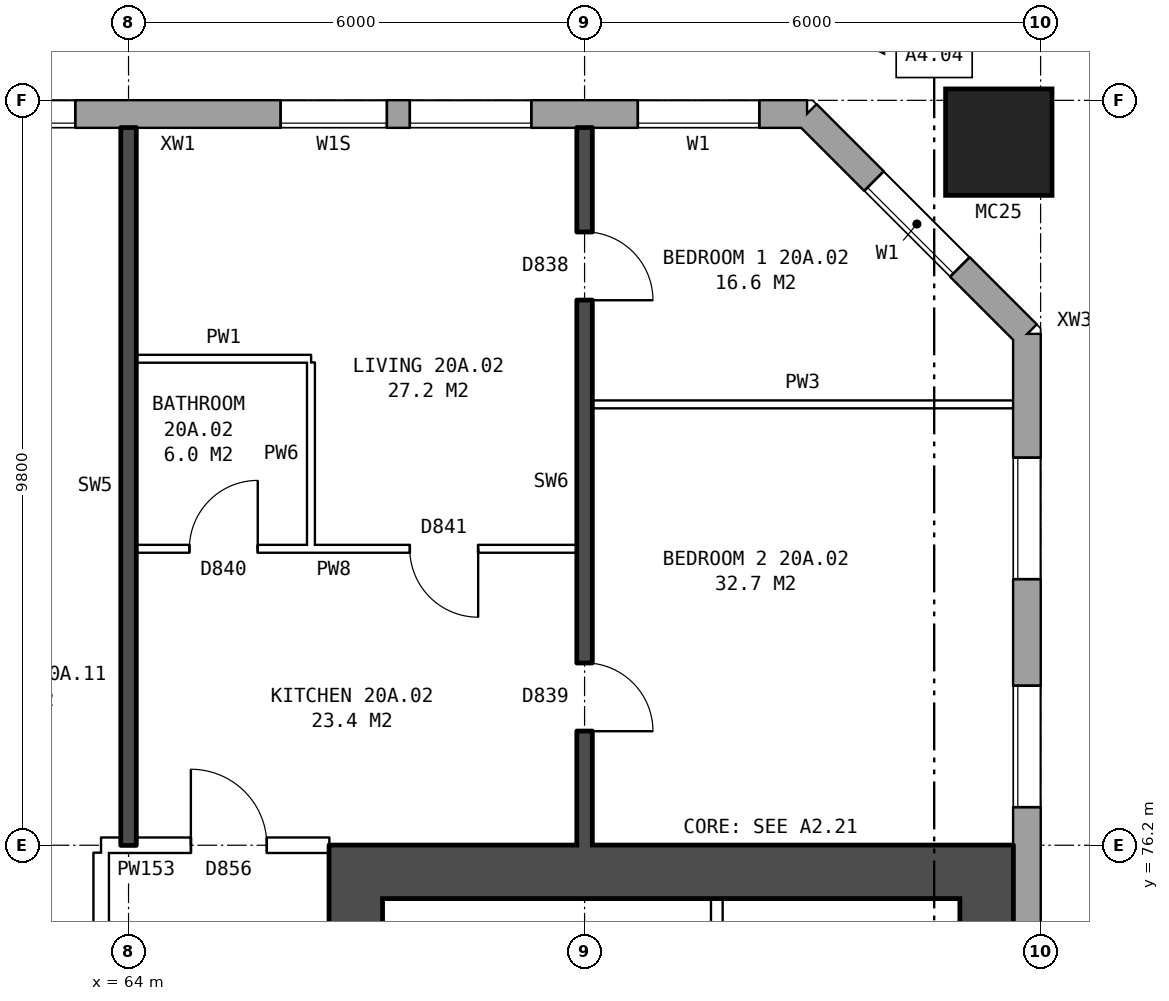
"""IFC4 building model, lengths in metres.
Left out: names, types, materials, properties, quantities, classifications, styles, units other than length and angle.
Written with IfcOpenShell. Run it as: python <this file> out.ifc"""

import sys

from ifc_helpers import new_model, si_unit, direction, frame, frame_2d, origin, origin_2d, place, context, subcontext, project, spatial, rectangle, hollow_rectangle, extrude, element, fill, save


model = new_model("IFC4")
c1 = context("Model", 3, precision=1e-05, world=origin(), true_north=direction((0.0, 1.0)))
c2 = subcontext(c1, "Body", "Model", "MODEL_VIEW")
j1 = project(units=[si_unit("LENGTHUNIT", "METRE"), si_unit("PLANEANGLEUNIT", "RADIAN")], contexts=[c1])
p1 = place(None, origin())
s1 = spatial("IfcSite", under=j1, at=p1, CompositionType="ELEMENT")
p2 = place(p1, origin())
s2 = spatial("IfcBuilding", under=s1, at=p2, CompositionType="ELEMENT")
p3 = place(p2, frame((0.0, 0.0, 74.7)))
s3 = spatial("IfcBuildingStorey", under=s2, at=p3, CompositionType="ELEMENT", Elevation=74.7)
p4 = place(p3, frame((75.45, 85.45, 0.0), z_axis=(0.0, 0.0, 1.0), x_axis=(1.0, 0.0, 0.0)))
e1 = element("IfcColumn", 1, at=p4, inside=s3, PredefinedType="COLUMN", context=c2, shape_type="SweptSolid", body=[
    extrude(hollow_rectangle(XDim=1.4, YDim=1.4, WallThickness=0.075, at=origin_2d()), origin(), (0.0, 0.0, 1.0), 3.1),
])
p5 = place(p3, frame((75.82, 57.075, 0.0), z_axis=(0.0, 0.0, 1.0), x_axis=(0.0, 1.0, 0.0)))
e2 = element("IfcWall", 2, at=p5, inside=s3, PredefinedType="STANDARD", context=c2, shape_type="SweptSolid", body=[
    extrude(rectangle(XDim=25.851, YDim=0.36, at=frame_2d((12.925, 0.0))), origin(), (0.0, 0.0, 1.0), 2.85),
])
p6 = place(p5, frame((1.625, 0.0, 0.8)))
e3 = element("IfcOpeningElement", 3, at=p6, cuts=e2, PredefinedType="OPENING", context=c2, shape_type="SweptSolid", body=[
    extrude(rectangle(XDim=1.6, YDim=1.8, at=frame_2d((0.8, 0.9))), frame((0.0, 0.19, 0.0), z_axis=(0.0, -1.0, 0.0), x_axis=(1.0, 0.0, 0.0)), (0.0, 0.0, 1.0), 0.38),
])
p7 = place(p5, frame((4.625, 0.0, 0.8)))
e4 = element("IfcOpeningElement", 4, at=p7, cuts=e2, PredefinedType="OPENING", context=c2, shape_type="SweptSolid", body=[
    extrude(rectangle(XDim=1.6, YDim=1.8, at=frame_2d((0.8, 0.9))), frame((0.0, 0.19, 0.0), z_axis=(0.0, -1.0, 0.0), x_axis=(1.0, 0.0, 0.0)), (0.0, 0.0, 1.0), 0.38),
])
p8 = place(p5, frame((19.625, 0.0, 0.8)))
e5 = element("IfcOpeningElement", 5, at=p8, cuts=e2, PredefinedType="OPENING", context=c2, shape_type="SweptSolid", body=[
    extrude(rectangle(XDim=1.6, YDim=1.8, at=frame_2d((0.8, 0.9))), frame((0.0, 0.19, 0.0), z_axis=(0.0, -1.0, 0.0), x_axis=(1.0, 0.0, 0.0)), (0.0, 0.0, 1.0), 0.38),
])
p9 = place(p5, frame((22.625, 0.0, 0.8)))
e6 = element("IfcOpeningElement", 6, at=p9, cuts=e2, PredefinedType="OPENING", context=c2, shape_type="SweptSolid", body=[
    extrude(rectangle(XDim=1.6, YDim=1.8, at=frame_2d((0.8, 0.9))), frame((0.0, 0.19, 0.0), z_axis=(0.0, -1.0, 0.0), x_axis=(1.0, 0.0, 0.0)), (0.0, 0.0, 1.0), 0.38),
])
p10 = place(p3, frame((75.82, 82.925, 0.0), z_axis=(0.0, 0.0, 1.0), x_axis=(-0.707106781187, 0.707106781187, 0.0)))
e7 = element("IfcWall", 7, at=p10, inside=s3, PredefinedType="STANDARD", context=c2, shape_type="SweptSolid", body=[
    extrude(rectangle(XDim=4.094, YDim=0.36, at=frame_2d((2.047, 0.0))), origin(), (0.0, 0.0, 1.0), 2.85),
])
p11 = place(p10, frame((1.247, 0.0, 0.8)))
e8 = element("IfcOpeningElement", 8, at=p11, cuts=e7, PredefinedType="OPENING", context=c2, shape_type="SweptSolid", body=[
    extrude(rectangle(XDim=1.6, YDim=1.8, at=frame_2d((0.8, 0.9))), frame((0.0, 0.19, 0.0), z_axis=(0.0, -1.0, 0.0), x_axis=(1.0, 0.0, 0.0)), (0.0, 0.0, 1.0), 0.38),
])
p12 = place(p3, frame((72.925, 85.82, 0.0), z_axis=(0.0, 0.0, 1.0), x_axis=(-1.0, 0.0, 0.0)))
e9 = element("IfcWall", 9, at=p12, inside=s3, PredefinedType="STANDARD", context=c2, shape_type="SweptSolid", body=[
    extrude(rectangle(XDim=46.601, YDim=0.36, at=frame_2d((23.3, 0.0))), origin(), (0.0, 0.0, 1.0), 2.85),
])
p13 = place(p12, frame((0.625, 0.0, 0.8)))
e10 = element("IfcOpeningElement", 10, at=p13, cuts=e9, PredefinedType="OPENING", context=c2, shape_type="SweptSolid", body=[
    extrude(rectangle(XDim=1.6, YDim=1.8, at=frame_2d((0.8, 0.9))), frame((0.0, 0.19, 0.0), z_axis=(0.0, -1.0, 0.0), x_axis=(1.0, 0.0, 0.0)), (0.0, 0.0, 1.0), 0.38),
])
p14 = place(p12, frame((3.625, 0.0, 0.8)))
e11 = element("IfcOpeningElement", 11, at=p14, cuts=e9, PredefinedType="OPENING", context=c2, shape_type="SweptSolid", body=[
    extrude(rectangle(XDim=1.6, YDim=1.8, at=frame_2d((0.8, 0.9))), frame((0.0, 0.19, 0.0), z_axis=(0.0, -1.0, 0.0), x_axis=(1.0, 0.0, 0.0)), (0.0, 0.0, 1.0), 0.38),
])
p15 = place(p12, frame((5.525, 0.0, 1.7)))
e12 = element("IfcOpeningElement", 12, at=p15, cuts=e9, PredefinedType="OPENING", context=c2, shape_type="SweptSolid", body=[
    extrude(rectangle(XDim=1.4, YDim=0.9, at=frame_2d((0.7, 0.45))), frame((0.0, 0.19, 0.0), z_axis=(0.0, -1.0, 0.0), x_axis=(1.0, 0.0, 0.0)), (0.0, 0.0, 1.0), 0.38),
])
p16 = place(p12, frame((9.625, 0.0, 0.8)))
e13 = element("IfcOpeningElement", 13, at=p16, cuts=e9, PredefinedType="OPENING", context=c2, shape_type="SweptSolid", body=[
    extrude(rectangle(XDim=1.6, YDim=1.8, at=frame_2d((0.8, 0.9))), frame((0.0, 0.19, 0.0), z_axis=(0.0, -1.0, 0.0), x_axis=(1.0, 0.0, 0.0)), (0.0, 0.0, 1.0), 0.38),
])
p17 = place(p12, frame((12.625, 0.0, 0.8)))
e14 = element("IfcOpeningElement", 14, at=p17, cuts=e9, PredefinedType="OPENING", context=c2, shape_type="SweptSolid", body=[
    extrude(rectangle(XDim=1.6, YDim=1.8, at=frame_2d((0.8, 0.9))), frame((0.0, 0.19, 0.0), z_axis=(0.0, -1.0, 0.0), x_axis=(1.0, 0.0, 0.0)), (0.0, 0.0, 1.0), 0.38),
])
p18 = place(p12, frame((15.625, 0.0, 0.8)))
e15 = element("IfcOpeningElement", 15, at=p18, cuts=e9, PredefinedType="OPENING", context=c2, shape_type="SweptSolid", body=[
    extrude(rectangle(XDim=1.6, YDim=1.8, at=frame_2d((0.8, 0.9))), frame((0.0, 0.19, 0.0), z_axis=(0.0, -1.0, 0.0), x_axis=(1.0, 0.0, 0.0)), (0.0, 0.0, 1.0), 0.38),
])
p19 = place(p12, frame((18.625, 0.0, 0.8)))
e16 = element("IfcOpeningElement", 16, at=p19, cuts=e9, PredefinedType="OPENING", context=c2, shape_type="SweptSolid", body=[
    extrude(rectangle(XDim=1.6, YDim=1.8, at=frame_2d((0.8, 0.9))), frame((0.0, 0.19, 0.0), z_axis=(0.0, -1.0, 0.0), x_axis=(1.0, 0.0, 0.0)), (0.0, 0.0, 1.0), 0.38),
])
p20 = place(p12, frame((21.625, 0.0, 0.8)))
e17 = element("IfcOpeningElement", 17, at=p20, cuts=e9, PredefinedType="OPENING", context=c2, shape_type="SweptSolid", body=[
    extrude(rectangle(XDim=1.6, YDim=1.8, at=frame_2d((0.8, 0.9))), frame((0.0, 0.19, 0.0), z_axis=(0.0, -1.0, 0.0), x_axis=(1.0, 0.0, 0.0)), (0.0, 0.0, 1.0), 0.38),
])
p21 = place(p12, frame((24.625, 0.0, 0.8)))
e18 = element("IfcOpeningElement", 18, at=p21, cuts=e9, PredefinedType="OPENING", context=c2, shape_type="SweptSolid", body=[
    extrude(rectangle(XDim=1.6, YDim=1.8, at=frame_2d((0.8, 0.9))), frame((0.0, 0.19, 0.0), z_axis=(0.0, -1.0, 0.0), x_axis=(1.0, 0.0, 0.0)), (0.0, 0.0, 1.0), 0.38),
])
p22 = place(p12, frame((27.625, 0.0, 0.8)))
e19 = element("IfcOpeningElement", 19, at=p22, cuts=e9, PredefinedType="OPENING", context=c2, shape_type="SweptSolid", body=[
    extrude(rectangle(XDim=1.6, YDim=1.8, at=frame_2d((0.8, 0.9))), frame((0.0, 0.19, 0.0), z_axis=(0.0, -1.0, 0.0), x_axis=(1.0, 0.0, 0.0)), (0.0, 0.0, 1.0), 0.38),
])
p23 = place(p12, frame((30.625, 0.0, 0.8)))
e20 = element("IfcOpeningElement", 20, at=p23, cuts=e9, PredefinedType="OPENING", context=c2, shape_type="SweptSolid", body=[
    extrude(rectangle(XDim=1.6, YDim=1.8, at=frame_2d((0.8, 0.9))), frame((0.0, 0.19, 0.0), z_axis=(0.0, -1.0, 0.0), x_axis=(1.0, 0.0, 0.0)), (0.0, 0.0, 1.0), 0.38),
])
p24 = place(p12, frame((33.625, 0.0, 0.8)))
e21 = element("IfcOpeningElement", 21, at=p24, cuts=e9, PredefinedType="OPENING", context=c2, shape_type="SweptSolid", body=[
    extrude(rectangle(XDim=1.6, YDim=1.8, at=frame_2d((0.8, 0.9))), frame((0.0, 0.19, 0.0), z_axis=(0.0, -1.0, 0.0), x_axis=(1.0, 0.0, 0.0)), (0.0, 0.0, 1.0), 0.38),
])
p25 = place(p12, frame((36.125, 0.0, 0.8)))
e22 = element("IfcOpeningElement", 22, at=p25, cuts=e9, PredefinedType="OPENING", context=c2, shape_type="SweptSolid", body=[
    extrude(rectangle(XDim=1.0, YDim=1.8, at=frame_2d((0.5, 0.9))), frame((0.0, 0.19, 0.0), z_axis=(0.0, -1.0, 0.0), x_axis=(1.0, 0.0, 0.0)), (0.0, 0.0, 1.0), 0.38),
])
p26 = place(p12, frame((39.625, 0.0, 1.7)))
e23 = element("IfcOpeningElement", 23, at=p26, cuts=e9, PredefinedType="OPENING", context=c2, shape_type="SweptSolid", body=[
    extrude(rectangle(XDim=0.8, YDim=0.9, at=frame_2d((0.4, 0.45))), frame((0.0, 0.19, 0.0), z_axis=(0.0, -1.0, 0.0), x_axis=(1.0, 0.0, 0.0)), (0.0, 0.0, 1.0), 0.38),
])
p27 = place(p12, frame((42.625, 0.0, 0.8)))
e24 = element("IfcOpeningElement", 24, at=p27, cuts=e9, PredefinedType="OPENING", context=c2, shape_type="SweptSolid", body=[
    extrude(rectangle(XDim=1.6, YDim=1.8, at=frame_2d((0.8, 0.9))), frame((0.0, 0.19, 0.0), z_axis=(0.0, -1.0, 0.0), x_axis=(1.0, 0.0, 0.0)), (0.0, 0.0, 1.0), 0.38),
])
p28 = place(p12, frame((37.425, 0.0, 0.8)))
e25 = element("IfcOpeningElement", 25, at=p28, cuts=e9, PredefinedType="OPENING", context=c2, shape_type="SweptSolid", body=[
    extrude(rectangle(XDim=0.8, YDim=0.9, at=frame_2d((0.4, 0.45))), frame((0.0, 0.19, 0.0), z_axis=(0.0, -1.0, 0.0), x_axis=(1.0, 0.0, 0.0)), (0.0, 0.0, 1.0), 0.38),
])
p29 = place(p12, frame((40.725, 0.0, 0.8)))
e26 = element("IfcOpeningElement", 26, at=p29, cuts=e9, PredefinedType="OPENING", context=c2, shape_type="SweptSolid", body=[
    extrude(rectangle(XDim=1.6, YDim=1.8, at=frame_2d((0.8, 0.9))), frame((0.0, 0.19, 0.0), z_axis=(0.0, -1.0, 0.0), x_axis=(1.0, 0.0, 0.0)), (0.0, 0.0, 1.0), 0.38),
])
p30 = place(p3, frame((66.99, 64.5, 0.0), z_axis=(0.0, 0.0, 1.0), x_axis=(0.0, 1.0, 0.0)))
e27 = element("IfcWall", 27, at=p30, inside=s3, PredefinedType="SHEAR", context=c2, shape_type="SweptSolid", body=[
    extrude(rectangle(XDim=11.0, YDim=0.7, at=frame_2d((5.5, 0.0))), origin(), (0.0, 0.0, 1.0), 2.85),
])
p31 = place(p30, frame((0.625, 0.0, 0.0)))
e28 = element("IfcOpeningElement", 28, at=p31, cuts=e27, PredefinedType="OPENING", context=c2, shape_type="SweptSolid", body=[
    extrude(rectangle(XDim=1.1, YDim=2.1, at=frame_2d((0.55, 1.05))), frame((0.0, 0.36, 0.0), z_axis=(0.0, -1.0, 0.0), x_axis=(1.0, 0.0, 0.0)), (0.0, 0.0, 1.0), 0.72),
])
p32 = place(p30, frame((9.2, 0.0, 0.0)))
e29 = element("IfcOpeningElement", 29, at=p32, cuts=e27, PredefinedType="OPENING", context=c2, shape_type="SweptSolid", body=[
    extrude(rectangle(XDim=1.1, YDim=2.1, at=frame_2d((0.55, 1.05))), frame((0.0, 0.36, 0.0), z_axis=(0.0, -1.0, 0.0), x_axis=(1.0, 0.0, 0.0)), (0.0, 0.0, 1.0), 0.72),
])
p33 = place(p3, frame((75.29, 64.5, 0.0), z_axis=(0.0, 0.0, 1.0), x_axis=(0.0, 1.0, 0.0)))
e30 = element("IfcWall", 30, at=p33, inside=s3, PredefinedType="SHEAR", context=c2, shape_type="SweptSolid", body=[
    extrude(rectangle(XDim=11.0, YDim=0.7, at=frame_2d((5.5, 0.0))), origin(), (0.0, 0.0, 1.0), 2.85),
])
p34 = place(p3, frame((66.64, 75.85, 0.0), z_axis=(0.0, 0.0, 1.0), x_axis=(1.0, 0.0, 0.0)))
e31 = element("IfcWall", 31, at=p34, inside=s3, PredefinedType="SHEAR", context=c2, shape_type="SweptSolid", body=[
    extrude(rectangle(XDim=9.0, YDim=0.7, at=frame_2d((4.5, 0.0))), origin(), (0.0, 0.0, 1.0), 2.85),
])
p35 = place(p3, frame((71.74, 73.45, 0.0), z_axis=(0.0, 0.0, 1.0), x_axis=(0.0, 1.0, 0.0)))
e32 = element("IfcWall", 32, at=p35, inside=s3, PredefinedType="PARTITIONING", context=c2, shape_type="SweptSolid", body=[
    extrude(rectangle(XDim=2.05, YDim=0.15, at=frame_2d((1.025, 0.0))), origin(), (0.0, 0.0, 1.0), 2.85),
])
p36 = place(p35, frame((0.6, 0.0, 0.0)))
e33 = element("IfcOpeningElement", 33, at=p36, cuts=e32, PredefinedType="OPENING", context=c2, shape_type="SweptSolid", body=[
    extrude(rectangle(XDim=0.85, YDim=2.1, at=frame_2d((0.425, 1.05))), frame((0.0, 0.085, 0.0), z_axis=(0.0, -1.0, 0.0), x_axis=(1.0, 0.0, 0.0)), (0.0, 0.0, 1.0), 0.17),
])
p37 = place(p3, frame((63.64, 63.9, 0.0), z_axis=(0.0, 0.0, 1.0), x_axis=(0.0, 1.0, 0.0)))
e34 = element("IfcWall", 34, at=p37, inside=s3, PredefinedType="PARTITIONING", context=c2, shape_type="SweptSolid", body=[
    extrude(rectangle(XDim=12.2, YDim=0.2, at=frame_2d((6.1, 0.0))), origin(), (0.0, 0.0, 1.0), 2.85),
])
p38 = place(p37, frame((5.1, 0.0, 0.0)))
e35 = element("IfcOpeningElement", 35, at=p38, cuts=e34, PredefinedType="OPENING", context=c2, shape_type="SweptSolid", body=[
    extrude(rectangle(XDim=2.0, YDim=2.1, at=frame_2d((1.0, 1.05))), frame((0.0, 0.11, 0.0), z_axis=(0.0, -1.0, 0.0), x_axis=(1.0, 0.0, 0.0)), (0.0, 0.0, 1.0), 0.22),
])
p39 = place(p3, frame((63.64, 76.2, 0.0), z_axis=(0.0, 0.0, 1.0), x_axis=(1.0, 0.0, 0.0)))
e36 = element("IfcWall", 36, at=p39, inside=s3, PredefinedType="PARTITIONING", context=c2, shape_type="SweptSolid", body=[
    extrude(rectangle(XDim=3.0, YDim=0.2, at=frame_2d((1.5, 0.0))), origin(), (0.0, 0.0, 1.0), 2.85),
])
p40 = place(p39, frame((1.18, 0.0, 0.0)))
e37 = element("IfcOpeningElement", 37, at=p40, cuts=e36, PredefinedType="OPENING", context=c2, shape_type="SweptSolid", body=[
    extrude(rectangle(XDim=1.0, YDim=2.1, at=frame_2d((0.5, 1.05))), frame((0.0, 0.11, 0.0), z_axis=(0.0, -1.0, 0.0), x_axis=(1.0, 0.0, 0.0)), (0.0, 0.0, 1.0), 0.22),
])
p41 = place(p3, frame((64.1, 80.1, 0.0), z_axis=(0.0, 0.0, 1.0), x_axis=(1.0, 0.0, 0.0)))
e38 = element("IfcWall", 38, at=p41, inside=s3, PredefinedType="PARTITIONING", context=c2, shape_type="SweptSolid", body=[
    extrude(rectangle(XDim=5.8, YDim=0.1, at=frame_2d((2.9, 0.0))), origin(), (0.0, 0.0, 1.0), 2.85),
])
p42 = place(p41, frame((3.6, 0.0, 0.0)))
e39 = element("IfcOpeningElement", 39, at=p42, cuts=e38, PredefinedType="OPENING", context=c2, shape_type="SweptSolid", body=[
    extrude(rectangle(XDim=0.9, YDim=2.1, at=frame_2d((0.45, 1.05))), frame((0.0, 0.06, 0.0), z_axis=(0.0, -1.0, 0.0), x_axis=(1.0, 0.0, 0.0)), (0.0, 0.0, 1.0), 0.12),
])
p43 = place(p41, frame((0.7, 0.0, 0.0)))
e40 = element("IfcOpeningElement", 40, at=p43, cuts=e38, PredefinedType="OPENING", context=c2, shape_type="SweptSolid", body=[
    extrude(rectangle(XDim=0.9, YDim=2.1, at=frame_2d((0.45, 1.05))), frame((0.0, 0.06, 0.0), z_axis=(0.0, -1.0, 0.0), x_axis=(1.0, 0.0, 0.0)), (0.0, 0.0, 1.0), 0.12),
])
p44 = place(p3, frame((70.1, 82.0, 0.0), z_axis=(0.0, 0.0, 1.0), x_axis=(1.0, 0.0, 0.0)))
e41 = element("IfcWall", 41, at=p44, inside=s3, PredefinedType="PARTITIONING", context=c2, shape_type="SweptSolid", body=[
    extrude(rectangle(XDim=5.54, YDim=0.1, at=frame_2d((2.77, 0.0))), origin(), (0.0, 0.0, 1.0), 2.85),
])
p45 = place(p3, frame((64.1, 82.6, 0.0), z_axis=(0.0, 0.0, 1.0), x_axis=(1.0, 0.0, 0.0)))
e42 = element("IfcWall", 42, at=p45, inside=s3, PredefinedType="PARTITIONING", context=c2, shape_type="SweptSolid", body=[
    extrude(rectangle(XDim=2.3, YDim=0.1, at=frame_2d((1.15, 0.0))), origin(), (0.0, 0.0, 1.0), 2.85),
])
p46 = place(p3, frame((64.0, 76.2, 0.0), z_axis=(0.0, 0.0, 1.0), x_axis=(0.0, 1.0, 0.0)))
e43 = element("IfcWall", 43, at=p46, inside=s3, PredefinedType="SOLIDWALL", context=c2, shape_type="SweptSolid", body=[
    extrude(rectangle(XDim=9.44, YDim=0.2, at=frame_2d((4.72, 0.0))), origin(), (0.0, 0.0, 1.0), 2.85),
])
p47 = place(p3, frame((66.4, 80.15, 0.0), z_axis=(0.0, 0.0, 1.0), x_axis=(0.0, 1.0, 0.0)))
e44 = element("IfcWall", 44, at=p47, inside=s3, PredefinedType="PARTITIONING", context=c2, shape_type="SweptSolid", body=[
    extrude(rectangle(XDim=2.4, YDim=0.1, at=frame_2d((1.2, 0.0))), origin(), (0.0, 0.0, 1.0), 2.85),
])
p48 = place(p3, frame((70.0, 76.2, 0.0), z_axis=(0.0, 0.0, 1.0), x_axis=(0.0, 1.0, 0.0)))
e45 = element("IfcWall", 45, at=p48, inside=s3, PredefinedType="SOLIDWALL", context=c2, shape_type="SweptSolid", body=[
    extrude(rectangle(XDim=9.44, YDim=0.2, at=frame_2d((4.72, 0.0))), origin(), (0.0, 0.0, 1.0), 2.85),
])
p49 = place(p48, frame((7.17, 0.0, 0.0)))
e46 = element("IfcOpeningElement", 46, at=p49, cuts=e45, PredefinedType="OPENING", context=c2, shape_type="SweptSolid", body=[
    extrude(rectangle(XDim=0.9, YDim=2.1, at=frame_2d((0.45, 1.05))), frame((0.0, 0.11, 0.0), z_axis=(0.0, -1.0, 0.0), x_axis=(1.0, 0.0, 0.0)), (0.0, 0.0, 1.0), 0.22),
])
p50 = place(p48, frame((1.5, 0.0, 0.0)))
e47 = element("IfcOpeningElement", 47, at=p50, cuts=e45, PredefinedType="OPENING", context=c2, shape_type="SweptSolid", body=[
    extrude(rectangle(XDim=0.9, YDim=2.1, at=frame_2d((0.45, 1.05))), frame((0.0, 0.11, 0.0), z_axis=(0.0, -1.0, 0.0), x_axis=(1.0, 0.0, 0.0)), (0.0, 0.0, 1.0), 0.22),
])
p51 = place(p8, origin())
e48 = element("IfcWindow", 48, at=p51, inside=s3, PartitioningType="SINGLE_PANEL", PredefinedType="WINDOW", context=c2, shape_type="SweptSolid", body=[
    extrude(rectangle(XDim=1.6, YDim=1.8, at=frame_2d((0.8, 0.9))), frame((0.0, 0.15, 0.0), z_axis=(0.0, -1.0, 0.0), x_axis=(1.0, 0.0, 0.0)), (0.0, 0.0, 1.0), 0.06),
])
fill(e5, e48)
p52 = place(p9, origin())
e49 = element("IfcWindow", 49, at=p52, inside=s3, PartitioningType="SINGLE_PANEL", PredefinedType="WINDOW", context=c2, shape_type="SweptSolid", body=[
    extrude(rectangle(XDim=1.6, YDim=1.8, at=frame_2d((0.8, 0.9))), frame((0.0, 0.15, 0.0), z_axis=(0.0, -1.0, 0.0), x_axis=(1.0, 0.0, 0.0)), (0.0, 0.0, 1.0), 0.06),
])
fill(e6, e49)
p53 = place(p11, origin())
e50 = element("IfcWindow", 50, at=p53, inside=s3, PartitioningType="SINGLE_PANEL", PredefinedType="WINDOW", context=c2, shape_type="SweptSolid", body=[
    extrude(rectangle(XDim=1.6, YDim=1.8, at=frame_2d((0.8, 0.9))), frame((0.0, 0.15, 0.0), z_axis=(0.0, -1.0, 0.0), x_axis=(1.0, 0.0, 0.0)), (0.0, 0.0, 1.0), 0.06),
])
fill(e8, e50)
p54 = place(p13, origin())
e51 = element("IfcWindow", 51, at=p54, inside=s3, PartitioningType="SINGLE_PANEL", PredefinedType="WINDOW", context=c2, shape_type="SweptSolid", body=[
    extrude(rectangle(XDim=1.6, YDim=1.8, at=frame_2d((0.8, 0.9))), frame((0.0, 0.15, 0.0), z_axis=(0.0, -1.0, 0.0), x_axis=(1.0, 0.0, 0.0)), (0.0, 0.0, 1.0), 0.06),
])
fill(e10, e51)
p55 = place(p14, origin())
e52 = element("IfcWindow", 52, at=p55, inside=s3, PartitioningType="SINGLE_PANEL", PredefinedType="WINDOW", context=c2, shape_type="SweptSolid", body=[
    extrude(rectangle(XDim=1.6, YDim=1.8, at=frame_2d((0.8, 0.9))), frame((0.0, 0.15, 0.0), z_axis=(0.0, -1.0, 0.0), x_axis=(1.0, 0.0, 0.0)), (0.0, 0.0, 1.0), 0.06),
])
fill(e11, e52)
p56 = place(p15, origin())
e53 = element("IfcWindow", 53, at=p56, inside=s3, PartitioningType="SINGLE_PANEL", PredefinedType="WINDOW", context=c2, shape_type="SweptSolid", body=[
    extrude(rectangle(XDim=1.4, YDim=0.9, at=frame_2d((0.7, 0.45))), frame((0.0, 0.15, 0.0), z_axis=(0.0, -1.0, 0.0), x_axis=(1.0, 0.0, 0.0)), (0.0, 0.0, 1.0), 0.06),
])
fill(e12, e53)
p57 = place(p16, origin())
e54 = element("IfcWindow", 54, at=p57, inside=s3, PartitioningType="SINGLE_PANEL", PredefinedType="WINDOW", context=c2, shape_type="SweptSolid", body=[
    extrude(rectangle(XDim=1.6, YDim=1.8, at=frame_2d((0.8, 0.9))), frame((0.0, 0.15, 0.0), z_axis=(0.0, -1.0, 0.0), x_axis=(1.0, 0.0, 0.0)), (0.0, 0.0, 1.0), 0.06),
])
fill(e13, e54)
p58 = place(p49, frame((0.9, 0.0, 0.0), z_axis=(0.0, 0.0, 1.0), x_axis=(-1.0, 0.0, 0.0)))
e55 = element("IfcDoor", 55, at=p58, inside=s3, OperationType="SINGLE_SWING_RIGHT", PredefinedType="DOOR", context=c2, shape_type="SweptSolid", body=[
    extrude(rectangle(XDim=0.9, YDim=2.1, at=frame_2d((0.45, 1.05))), frame((0.0, 0.025, 0.0), z_axis=(0.0, -1.0, 0.0), x_axis=(1.0, 0.0, 0.0)), (0.0, 0.0, 1.0), 0.05),
])
fill(e46, e55)
p59 = place(p50, frame((0.9, 0.0, 0.0), z_axis=(0.0, 0.0, 1.0), x_axis=(-1.0, 0.0, 0.0)))
e56 = element("IfcDoor", 56, at=p59, inside=s3, OperationType="SINGLE_SWING_RIGHT", PredefinedType="DOOR", context=c2, shape_type="SweptSolid", body=[
    extrude(rectangle(XDim=0.9, YDim=2.1, at=frame_2d((0.45, 1.05))), frame((0.0, 0.025, 0.0), z_axis=(0.0, -1.0, 0.0), x_axis=(1.0, 0.0, 0.0)), (0.0, 0.0, 1.0), 0.05),
])
fill(e47, e56)
p60 = place(p40, origin())
e57 = element("IfcDoor", 57, at=p60, inside=s3, OperationType="SINGLE_SWING_LEFT", PredefinedType="DOOR", context=c2, shape_type="SweptSolid", body=[
    extrude(rectangle(XDim=1.0, YDim=2.1, at=frame_2d((0.5, 1.05))), frame((0.0, 0.025, 0.0), z_axis=(0.0, -1.0, 0.0), x_axis=(1.0, 0.0, 0.0)), (0.0, 0.0, 1.0), 0.05),
])
fill(e37, e57)
p61 = place(p42, frame((0.9, 0.0, 0.0), z_axis=(0.0, 0.0, 1.0), x_axis=(-1.0, 0.0, 0.0)))
e58 = element("IfcDoor", 58, at=p61, inside=s3, OperationType="SINGLE_SWING_LEFT", PredefinedType="DOOR", context=c2, shape_type="SweptSolid", body=[
    extrude(rectangle(XDim=0.9, YDim=2.1, at=frame_2d((0.45, 1.05))), frame((0.0, 0.025, 0.0), z_axis=(0.0, -1.0, 0.0), x_axis=(1.0, 0.0, 0.0)), (0.0, 0.0, 1.0), 0.05),
])
fill(e39, e58)
p62 = place(p43, origin())
e59 = element("IfcDoor", 59, at=p62, inside=s3, OperationType="SINGLE_SWING_RIGHT", PredefinedType="DOOR", context=c2, shape_type="SweptSolid", body=[
    extrude(rectangle(XDim=0.9, YDim=2.1, at=frame_2d((0.45, 1.05))), frame((0.0, 0.025, 0.0), z_axis=(0.0, -1.0, 0.0), x_axis=(1.0, 0.0, 0.0)), (0.0, 0.0, 1.0), 0.05),
])
fill(e40, e59)
save(model, sys.argv[1])
